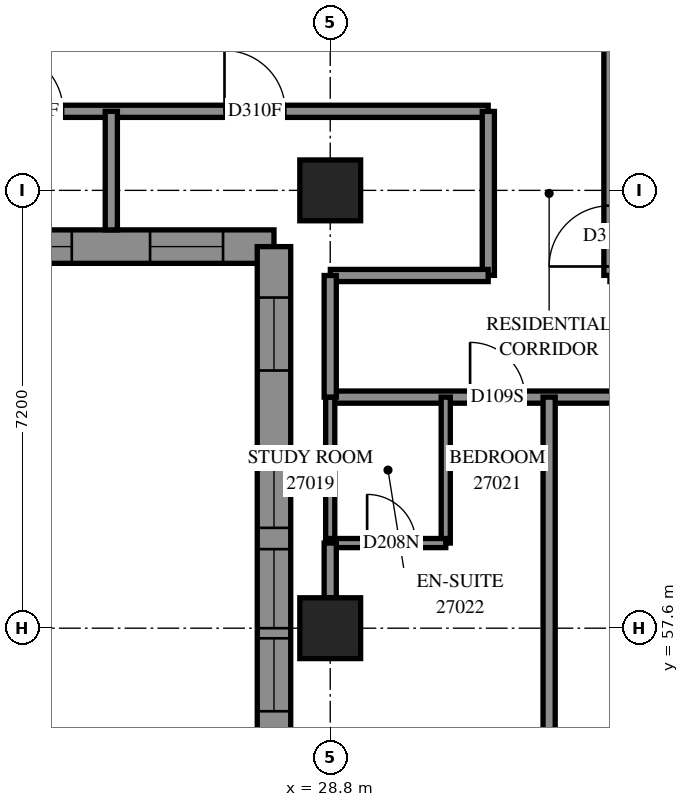
"""IFC4 building model, lengths in metres.
Left out: names, types, materials, properties, quantities, classifications, styles, units other than length and angle.
Written with IfcOpenShell. Run it as: python <this file> out.ifc"""

import sys

from ifc_helpers import new_model, si_unit, direction, frame, frame_2d, origin, origin_2d, place, context, subcontext, project, spatial, polyline, rectangle, outline, extrude, element, fill, save


model = new_model("IFC4")
c1 = context("Model", 3, precision=1e-05, world=origin(), true_north=direction((0.0, 1.0)))
c2 = subcontext(c1, "Body", "Model", "MODEL_VIEW")
j1 = project(units=[si_unit("LENGTHUNIT", "METRE"), si_unit("PLANEANGLEUNIT", "RADIAN")], contexts=[c1])
p1 = place(None, origin())
s1 = spatial("IfcSite", under=j1, at=p1, CompositionType="ELEMENT")
p2 = place(p1, origin())
s2 = spatial("IfcBuilding", under=s1, at=p2, CompositionType="ELEMENT")
p3 = place(p2, frame((0.0, 0.0, 101.6)))
s3 = spatial("IfcBuildingStorey", under=s2, at=p3, CompositionType="ELEMENT", Elevation=101.6)
for number, where, z_axis, x_axis in (
    (1, (28.8, 57.6, 0.0), (0.0, 0.0, 1.0), (1.0, 0.0, 0.0)),
    (2, (28.8, 64.8, 0.0), (0.0, 0.0, 1.0), (1.0, 0.0, 0.0)),
):
    element("IfcColumn", number, at=place(p3, frame(where, z_axis=z_axis, x_axis=x_axis)), inside=s3, PredefinedType="COLUMN", context=c2, shape_type="SweptSolid", body=[
        extrude(rectangle(XDim=1.0, YDim=1.0, at=origin_2d()), origin(), (0.0, 0.0, 1.0), 3.1),
    ])
p4 = place(p3, frame((19.593, 63.875, 0.0), z_axis=(0.0, 0.0, 1.0), x_axis=(1.0, 0.0, 0.0)))
e3 = element("IfcWall", 3, at=p4, inside=s3, PredefinedType="SOLIDWALL", context=c2, shape_type="SweptSolid", body=[
    extrude(outline(polyline([(-0.275, -0.275), (8.007, -0.275), (8.557, 0.275), (0.275, 0.275), (-0.275, -0.275)])), origin(), (0.0, 0.0, 1.0), 3.1),
])
p5 = place(p4, frame((2.157, 0.0, 0.5)))
e4 = element("IfcOpeningElement", 4, at=p5, cuts=e3, PredefinedType="OPENING", context=c2, shape_type="SweptSolid", body=[
    extrude(rectangle(XDim=1.3, YDim=2.45, at=frame_2d((0.65, 1.225))), frame((0.0, 0.285, 0.0), z_axis=(0.0, -1.0, 0.0), x_axis=(1.0, 0.0, 0.0)), (0.0, 0.0, 1.0), 0.57),
])
p6 = place(p4, frame((3.657, 0.0, 0.5)))
e5 = element("IfcOpeningElement", 5, at=p6, cuts=e3, PredefinedType="OPENING", context=c2, shape_type="SweptSolid", body=[
    extrude(rectangle(XDim=1.3, YDim=2.45, at=frame_2d((0.65, 1.225))), frame((0.0, 0.285, 0.0), z_axis=(0.0, -1.0, 0.0), x_axis=(1.0, 0.0, 0.0)), (0.0, 0.0, 1.0), 0.57),
])
p7 = place(p4, frame((0.641, 0.0, 0.5)))
e6 = element("IfcOpeningElement", 6, at=p7, cuts=e3, PredefinedType="OPENING", context=c2, shape_type="SweptSolid", body=[
    extrude(rectangle(XDim=1.2, YDim=2.45, at=frame_2d((0.6, 1.225))), frame((0.0, 0.285, 0.0), z_axis=(0.0, -1.0, 0.0), x_axis=(1.0, 0.0, 0.0)), (0.0, 0.0, 1.0), 0.57),
])
p8 = place(p4, frame((6.245, 0.0, 0.5)))
e7 = element("IfcOpeningElement", 7, at=p8, cuts=e3, PredefinedType="OPENING", context=c2, shape_type="SweptSolid", body=[
    extrude(rectangle(XDim=1.2, YDim=2.45, at=frame_2d((0.6, 1.225))), frame((0.0, 0.285, 0.0), z_axis=(0.0, -1.0, 0.0), x_axis=(1.0, 0.0, 0.0)), (0.0, 0.0, 1.0), 0.57),
])
p9 = place(p3, frame((27.875, 63.875, 0.0), z_axis=(0.0, 0.0, 1.0), x_axis=(0.0, -1.0, 0.0)))
e8 = element("IfcWall", 8, at=p9, inside=s3, PredefinedType="SOLIDWALL", context=c2, shape_type="SweptSolid", body=[
    extrude(outline(polyline([(0.275, -0.275), (8.557, -0.275), (8.007, 0.275), (-0.275, 0.275), (0.275, -0.275)])), origin(), (0.0, 0.0, 1.0), 3.1),
])
p10 = place(p9, frame((3.325, 0.0, 0.5)))
e9 = element("IfcOpeningElement", 9, at=p10, cuts=e8, PredefinedType="OPENING", context=c2, shape_type="SweptSolid", body=[
    extrude(rectangle(XDim=1.3, YDim=2.45, at=frame_2d((0.65, 1.225))), frame((0.0, 0.285, 0.0), z_axis=(0.0, -1.0, 0.0), x_axis=(1.0, 0.0, 0.0)), (0.0, 0.0, 1.0), 0.57),
])
p11 = place(p9, frame((4.975, 0.0, 0.5)))
e10 = element("IfcOpeningElement", 10, at=p11, cuts=e8, PredefinedType="OPENING", context=c2, shape_type="SweptSolid", body=[
    extrude(rectangle(XDim=1.3, YDim=2.45, at=frame_2d((0.65, 1.225))), frame((0.0, 0.285, 0.0), z_axis=(0.0, -1.0, 0.0), x_axis=(1.0, 0.0, 0.0)), (0.0, 0.0, 1.0), 0.57),
])
p12 = place(p9, frame((0.838, 0.0, 0.5)))
e11 = element("IfcOpeningElement", 11, at=p12, cuts=e8, PredefinedType="OPENING", context=c2, shape_type="SweptSolid", body=[
    extrude(rectangle(XDim=1.2, YDim=2.45, at=frame_2d((0.6, 1.225))), frame((0.0, 0.285, 0.0), z_axis=(0.0, -1.0, 0.0), x_axis=(1.0, 0.0, 0.0)), (0.0, 0.0, 1.0), 0.57),
])
p13 = place(p9, frame((6.441, 0.0, 0.5)))
e12 = element("IfcOpeningElement", 12, at=p13, cuts=e8, PredefinedType="OPENING", context=c2, shape_type="SweptSolid", body=[
    extrude(rectangle(XDim=1.2, YDim=2.45, at=frame_2d((0.6, 1.225))), frame((0.0, 0.285, 0.0), z_axis=(0.0, -1.0, 0.0), x_axis=(1.0, 0.0, 0.0)), (0.0, 0.0, 1.0), 0.57),
])
p14 = place(p3, frame((28.8, 61.4, 0.0), z_axis=(0.0, 0.0, 1.0), x_axis=(1.0, 0.0, 0.0)))
e13 = element("IfcWall", 13, at=p14, inside=s3, PredefinedType="PARTITIONING", context=c2, shape_type="SweptSolid", body=[
    extrude(rectangle(XDim=24.2, YDim=0.2, at=frame_2d((12.1, 0.0))), origin(), (0.0, 0.0, 1.0), 3.1),
])
p15 = place(p14, frame((2.3, 0.0, 0.0)))
e14 = element("IfcOpeningElement", 14, at=p15, cuts=e13, PredefinedType="OPENING", context=c2, shape_type="SweptSolid", body=[
    extrude(rectangle(XDim=0.9, YDim=2.1, at=frame_2d((0.45, 1.05))), frame((0.0, 0.11, 0.0), z_axis=(0.0, -1.0, 0.0), x_axis=(1.0, 0.0, 0.0)), (0.0, 0.0, 1.0), 0.22),
])
p16 = place(p14, frame((5.901, 0.0, 0.0)))
e15 = element("IfcOpeningElement", 15, at=p16, cuts=e13, PredefinedType="OPENING", context=c2, shape_type="SweptSolid", body=[
    extrude(rectangle(XDim=0.9, YDim=2.1, at=frame_2d((0.45, 1.05))), frame((0.0, 0.11, 0.0), z_axis=(0.0, -1.0, 0.0), x_axis=(1.0, 0.0, 0.0)), (0.0, 0.0, 1.0), 0.22),
])
p17 = place(p14, frame((11.307, 0.0, 0.0)))
e16 = element("IfcOpeningElement", 16, at=p17, cuts=e13, PredefinedType="OPENING", context=c2, shape_type="SweptSolid", body=[
    extrude(rectangle(XDim=1.0, YDim=2.1, at=frame_2d((0.5, 1.05))), frame((0.0, 0.11, 0.0), z_axis=(0.0, -1.0, 0.0), x_axis=(1.0, 0.0, 0.0)), (0.0, 0.0, 1.0), 0.22),
])
p18 = place(p14, frame((16.7, 0.0, 0.0)))
e17 = element("IfcOpeningElement", 17, at=p18, cuts=e13, PredefinedType="OPENING", context=c2, shape_type="SweptSolid", body=[
    extrude(rectangle(XDim=0.9, YDim=2.1, at=frame_2d((0.45, 1.05))), frame((0.0, 0.11, 0.0), z_axis=(0.0, -1.0, 0.0), x_axis=(1.0, 0.0, 0.0)), (0.0, 0.0, 1.0), 0.22),
])
p19 = place(p14, frame((18.508, 0.0, 0.0)))
e18 = element("IfcOpeningElement", 18, at=p19, cuts=e13, PredefinedType="OPENING", context=c2, shape_type="SweptSolid", body=[
    extrude(rectangle(XDim=1.0, YDim=2.1, at=frame_2d((0.5, 1.05))), frame((0.0, 0.11, 0.0), z_axis=(0.0, -1.0, 0.0), x_axis=(1.0, 0.0, 0.0)), (0.0, 0.0, 1.0), 0.22),
])
p20 = place(p14, frame((23.074, 0.0, 0.0)))
e19 = element("IfcOpeningElement", 19, at=p20, cuts=e13, PredefinedType="OPENING", context=c2, shape_type="SweptSolid", body=[
    extrude(rectangle(XDim=1.0, YDim=2.1, at=frame_2d((0.5, 1.05))), frame((0.0, 0.11, 0.0), z_axis=(0.0, -1.0, 0.0), x_axis=(1.0, 0.0, 0.0)), (0.0, 0.0, 1.0), 0.22),
])
p21 = place(p3, frame((21.602, 66.1, 0.0), z_axis=(0.0, 0.0, 1.0), x_axis=(1.0, 0.0, 0.0)))
e20 = element("IfcWall", 20, at=p21, inside=s3, PredefinedType="PARTITIONING", context=c2, shape_type="SweptSolid", body=[
    extrude(rectangle(XDim=9.796, YDim=0.2, at=frame_2d((4.898, 0.0))), origin(), (0.0, 0.0, 1.0), 3.1),
])
p22 = place(p21, frame((1.805, 0.0, 0.0)))
e21 = element("IfcOpeningElement", 21, at=p22, cuts=e20, PredefinedType="OPENING", context=c2, shape_type="SweptSolid", body=[
    extrude(rectangle(XDim=1.0, YDim=2.1, at=frame_2d((0.5, 1.05))), frame((0.0, 0.11, 0.0), z_axis=(0.0, -1.0, 0.0), x_axis=(1.0, 0.0, 0.0)), (0.0, 0.0, 1.0), 0.22),
])
p23 = place(p21, frame((5.459, 0.0, 0.0)))
e22 = element("IfcOpeningElement", 22, at=p23, cuts=e20, PredefinedType="OPENING", context=c2, shape_type="SweptSolid", body=[
    extrude(rectangle(XDim=1.0, YDim=2.1, at=frame_2d((0.5, 1.05))), frame((0.0, 0.11, 0.0), z_axis=(0.0, -1.0, 0.0), x_axis=(1.0, 0.0, 0.0)), (0.0, 0.0, 1.0), 0.22),
])
p24 = place(p3, frame((32.4, 55.868, 0.0), z_axis=(0.0, 0.0, 1.0), x_axis=(0.0, 1.0, 0.0)))
e23 = element("IfcWall", 23, at=p24, inside=s3, PredefinedType="PARTITIONING", context=c2, shape_type="SweptSolid", body=[
    extrude(rectangle(XDim=5.532, YDim=0.2, at=frame_2d((2.766, 0.0))), origin(), (0.0, 0.0, 1.0), 3.1),
])
p25 = place(p3, frame((33.4, 63.402, 0.0), z_axis=(0.0, 0.0, 1.0), x_axis=(0.0, 1.0, 0.0)))
e24 = element("IfcWall", 24, at=p25, inside=s3, PredefinedType="PARTITIONING", context=c2, shape_type="SweptSolid", body=[
    extrude(rectangle(XDim=4.698, YDim=0.2, at=frame_2d((2.349, 0.0))), origin(), (0.0, 0.0, 1.0), 3.1),
])
p26 = place(p25, frame((0.146, 0.0, 0.0)))
e25 = element("IfcOpeningElement", 25, at=p26, cuts=e24, PredefinedType="OPENING", context=c2, shape_type="SweptSolid", body=[
    extrude(rectangle(XDim=1.0, YDim=2.1, at=frame_2d((0.5, 1.05))), frame((0.0, 0.11, 0.0), z_axis=(0.0, -1.0, 0.0), x_axis=(1.0, 0.0, 0.0)), (0.0, 0.0, 1.0), 0.22),
])
p27 = place(p3, frame((31.4, 63.402, 0.0), z_axis=(0.0, 0.0, 1.0), x_axis=(0.0, 1.0, 0.0)))
e26 = element("IfcWall", 26, at=p27, inside=s3, PredefinedType="PARTITIONING", context=c2, shape_type="SweptSolid", body=[
    extrude(rectangle(XDim=2.696, YDim=0.2, at=frame_2d((1.348, 0.0))), origin(), (0.0, 0.0, 1.0), 3.1),
])
p28 = place(p3, frame((28.802, 63.4, 0.0), z_axis=(0.0, 0.0, 1.0), x_axis=(1.0, 0.0, 0.0)))
e27 = element("IfcWall", 27, at=p28, inside=s3, PredefinedType="PARTITIONING", context=c2, shape_type="SweptSolid", body=[
    extrude(rectangle(XDim=2.596, YDim=0.2, at=frame_2d((1.298, 0.0))), origin(), (0.0, 0.0, 1.0), 3.1),
])
p29 = place(p3, frame((30.7, 59.0, 0.0), z_axis=(0.0, 0.0, 1.0), x_axis=(0.0, 1.0, 0.0)))
e28 = element("IfcWall", 28, at=p29, inside=s3, PredefinedType="PARTITIONING", context=c2, shape_type="SweptSolid", body=[
    extrude(rectangle(XDim=2.4, YDim=0.15, at=frame_2d((1.2, 0.0))), origin(), (0.0, 0.0, 1.0), 3.1),
])
p30 = place(p3, frame((28.8, 59.0, 0.0), z_axis=(0.0, 0.0, 1.0), x_axis=(0.0, 1.0, 0.0)))
e29 = element("IfcWall", 29, at=p30, inside=s3, PredefinedType="PARTITIONING", context=c2, shape_type="SweptSolid", body=[
    extrude(rectangle(XDim=2.4, YDim=0.15, at=frame_2d((1.2, 0.0))), origin(), (0.0, 0.0, 1.0), 2.6),
])
p31 = place(p3, frame((28.8, 61.4, 0.0), z_axis=(0.0, 0.0, 1.0), x_axis=(0.0, 1.0, 0.0)))
e30 = element("IfcWall", 30, at=p31, inside=s3, PredefinedType="PARTITIONING", context=c2, shape_type="SweptSolid", body=[
    extrude(rectangle(XDim=2.0, YDim=0.2, at=frame_2d((1.0, 0.0))), origin(), (0.0, 0.0, 1.0), 2.6),
])
p32 = place(p3, frame((28.8, 59.0, 0.0), z_axis=(0.0, 0.0, 1.0), x_axis=(1.0, 0.0, 0.0)))
e31 = element("IfcWall", 31, at=p32, inside=s3, PredefinedType="PARTITIONING", context=c2, shape_type="SweptSolid", body=[
    extrude(rectangle(XDim=1.9, YDim=0.15, at=frame_2d((0.95, 0.0))), origin(), (0.0, 0.0, 1.0), 3.1),
])
p33 = place(p32, frame((0.607, 0.0, 0.0)))
e32 = element("IfcOpeningElement", 32, at=p33, cuts=e31, PredefinedType="OPENING", context=c2, shape_type="SweptSolid", body=[
    extrude(rectangle(XDim=0.8, YDim=2.1, at=frame_2d((0.4, 1.05))), frame((0.0, 0.085, 0.0), z_axis=(0.0, -1.0, 0.0), x_axis=(1.0, 0.0, 0.0)), (0.0, 0.0, 1.0), 0.17),
])
p34 = place(p3, frame((25.2, 64.15, 0.0), z_axis=(0.0, 0.0, 1.0), x_axis=(0.0, 1.0, 0.0)))
e33 = element("IfcWall", 33, at=p34, inside=s3, PredefinedType="PARTITIONING", context=c2, shape_type="SweptSolid", body=[
    extrude(rectangle(XDim=1.95, YDim=0.2, at=frame_2d((0.975, 0.0))), origin(), (0.0, 0.0, 1.0), 3.1),
])
p35 = place(p3, frame((28.8, 58.1, 0.0), z_axis=(0.0, 0.0, 1.0), x_axis=(0.0, 1.0, 0.0)))
e34 = element("IfcWall", 34, at=p35, inside=s3, PredefinedType="PARTITIONING", context=c2, shape_type="SweptSolid", body=[
    extrude(rectangle(XDim=0.9, YDim=0.2, at=frame_2d((0.45, 0.0))), origin(), (0.0, 0.0, 1.0), 2.6),
])
p36 = place(p6, origin())
e35 = element("IfcWindow", 35, at=p36, inside=s3, PartitioningType="SINGLE_PANEL", PredefinedType="WINDOW", context=c2, shape_type="SweptSolid", body=[
    extrude(rectangle(XDim=1.3, YDim=2.45, at=frame_2d((0.65, 1.225))), frame((0.0, 0.155, 0.0), z_axis=(0.0, -1.0, 0.0), x_axis=(1.0, 0.0, 0.0)), (0.0, 0.0, 1.0), 0.06),
])
fill(e5, e35)
p37 = place(p8, origin())
e36 = element("IfcWindow", 36, at=p37, inside=s3, PartitioningType="SINGLE_PANEL", PredefinedType="WINDOW", context=c2, shape_type="SweptSolid", body=[
    extrude(rectangle(XDim=1.2, YDim=2.45, at=frame_2d((0.6, 1.225))), frame((0.0, 0.155, 0.0), z_axis=(0.0, -1.0, 0.0), x_axis=(1.0, 0.0, 0.0)), (0.0, 0.0, 1.0), 0.06),
])
fill(e7, e36)
p38 = place(p10, origin())
e37 = element("IfcWindow", 37, at=p38, inside=s3, PartitioningType="SINGLE_PANEL", PredefinedType="WINDOW", context=c2, shape_type="SweptSolid", body=[
    extrude(rectangle(XDim=1.3, YDim=2.45, at=frame_2d((0.65, 1.225))), frame((0.0, 0.155, 0.0), z_axis=(0.0, -1.0, 0.0), x_axis=(1.0, 0.0, 0.0)), (0.0, 0.0, 1.0), 0.06),
])
fill(e9, e37)
p39 = place(p11, origin())
e38 = element("IfcWindow", 38, at=p39, inside=s3, PartitioningType="SINGLE_PANEL", PredefinedType="WINDOW", context=c2, shape_type="SweptSolid", body=[
    extrude(rectangle(XDim=1.3, YDim=2.45, at=frame_2d((0.65, 1.225))), frame((0.0, 0.155, 0.0), z_axis=(0.0, -1.0, 0.0), x_axis=(1.0, 0.0, 0.0)), (0.0, 0.0, 1.0), 0.06),
])
fill(e10, e38)
p40 = place(p12, origin())
e39 = element("IfcWindow", 39, at=p40, inside=s3, PartitioningType="SINGLE_PANEL", PredefinedType="WINDOW", context=c2, shape_type="SweptSolid", body=[
    extrude(rectangle(XDim=1.2, YDim=2.45, at=frame_2d((0.6, 1.225))), frame((0.0, 0.155, 0.0), z_axis=(0.0, -1.0, 0.0), x_axis=(1.0, 0.0, 0.0)), (0.0, 0.0, 1.0), 0.06),
])
fill(e11, e39)
p41 = place(p13, origin())
e40 = element("IfcWindow", 40, at=p41, inside=s3, PartitioningType="SINGLE_PANEL", PredefinedType="WINDOW", context=c2, shape_type="SweptSolid", body=[
    extrude(rectangle(XDim=1.2, YDim=2.45, at=frame_2d((0.6, 1.225))), frame((0.0, 0.155, 0.0), z_axis=(0.0, -1.0, 0.0), x_axis=(1.0, 0.0, 0.0)), (0.0, 0.0, 1.0), 0.06),
])
fill(e12, e40)
p42 = place(p22, origin())
e41 = element("IfcDoor", 41, at=p42, inside=s3, OperationType="SINGLE_SWING_RIGHT", PredefinedType="DOOR", context=c2, shape_type="SweptSolid", body=[
    extrude(rectangle(XDim=1.0, YDim=2.1, at=frame_2d((0.5, 1.05))), frame((0.0, 0.025, 0.0), z_axis=(0.0, -1.0, 0.0), x_axis=(1.0, 0.0, 0.0)), (0.0, 0.0, 1.0), 0.05),
])
fill(e21, e41)
p43 = place(p23, origin())
e42 = element("IfcDoor", 42, at=p43, inside=s3, OperationType="SINGLE_SWING_RIGHT", PredefinedType="DOOR", context=c2, shape_type="SweptSolid", body=[
    extrude(rectangle(XDim=1.0, YDim=2.1, at=frame_2d((0.5, 1.05))), frame((0.0, 0.025, 0.0), z_axis=(0.0, -1.0, 0.0), x_axis=(1.0, 0.0, 0.0)), (0.0, 0.0, 1.0), 0.05),
])
fill(e22, e42)
p44 = place(p15, origin())
e43 = element("IfcDoor", 43, at=p44, inside=s3, OperationType="SINGLE_SWING_LEFT", PredefinedType="DOOR", context=c2, shape_type="SweptSolid", body=[
    extrude(rectangle(XDim=0.9, YDim=2.1, at=frame_2d((0.45, 1.05))), frame((0.0, 0.025, 0.0), z_axis=(0.0, -1.0, 0.0), x_axis=(1.0, 0.0, 0.0)), (0.0, 0.0, 1.0), 0.05),
])
fill(e14, e43)
p45 = place(p33, origin())
e44 = element("IfcDoor", 44, at=p45, inside=s3, OperationType="SINGLE_SWING_RIGHT", PredefinedType="DOOR", context=c2, shape_type="SweptSolid", body=[
    extrude(rectangle(XDim=0.8, YDim=2.1, at=frame_2d((0.4, 1.05))), frame((0.0, 0.025, 0.0), z_axis=(0.0, -1.0, 0.0), x_axis=(1.0, 0.0, 0.0)), (0.0, 0.0, 1.0), 0.05),
])
fill(e32, e44)
p46 = place(p26, origin())
e45 = element("IfcDoor", 45, at=p46, inside=s3, OperationType="SINGLE_SWING_LEFT", PredefinedType="DOOR", context=c2, shape_type="SweptSolid", body=[
    extrude(rectangle(XDim=1.0, YDim=2.1, at=frame_2d((0.5, 1.05))), frame((0.0, 0.025, 0.0), z_axis=(0.0, -1.0, 0.0), x_axis=(1.0, 0.0, 0.0)), (0.0, 0.0, 1.0), 0.05),
])
fill(e25, e45)
save(model, sys.argv[1])
